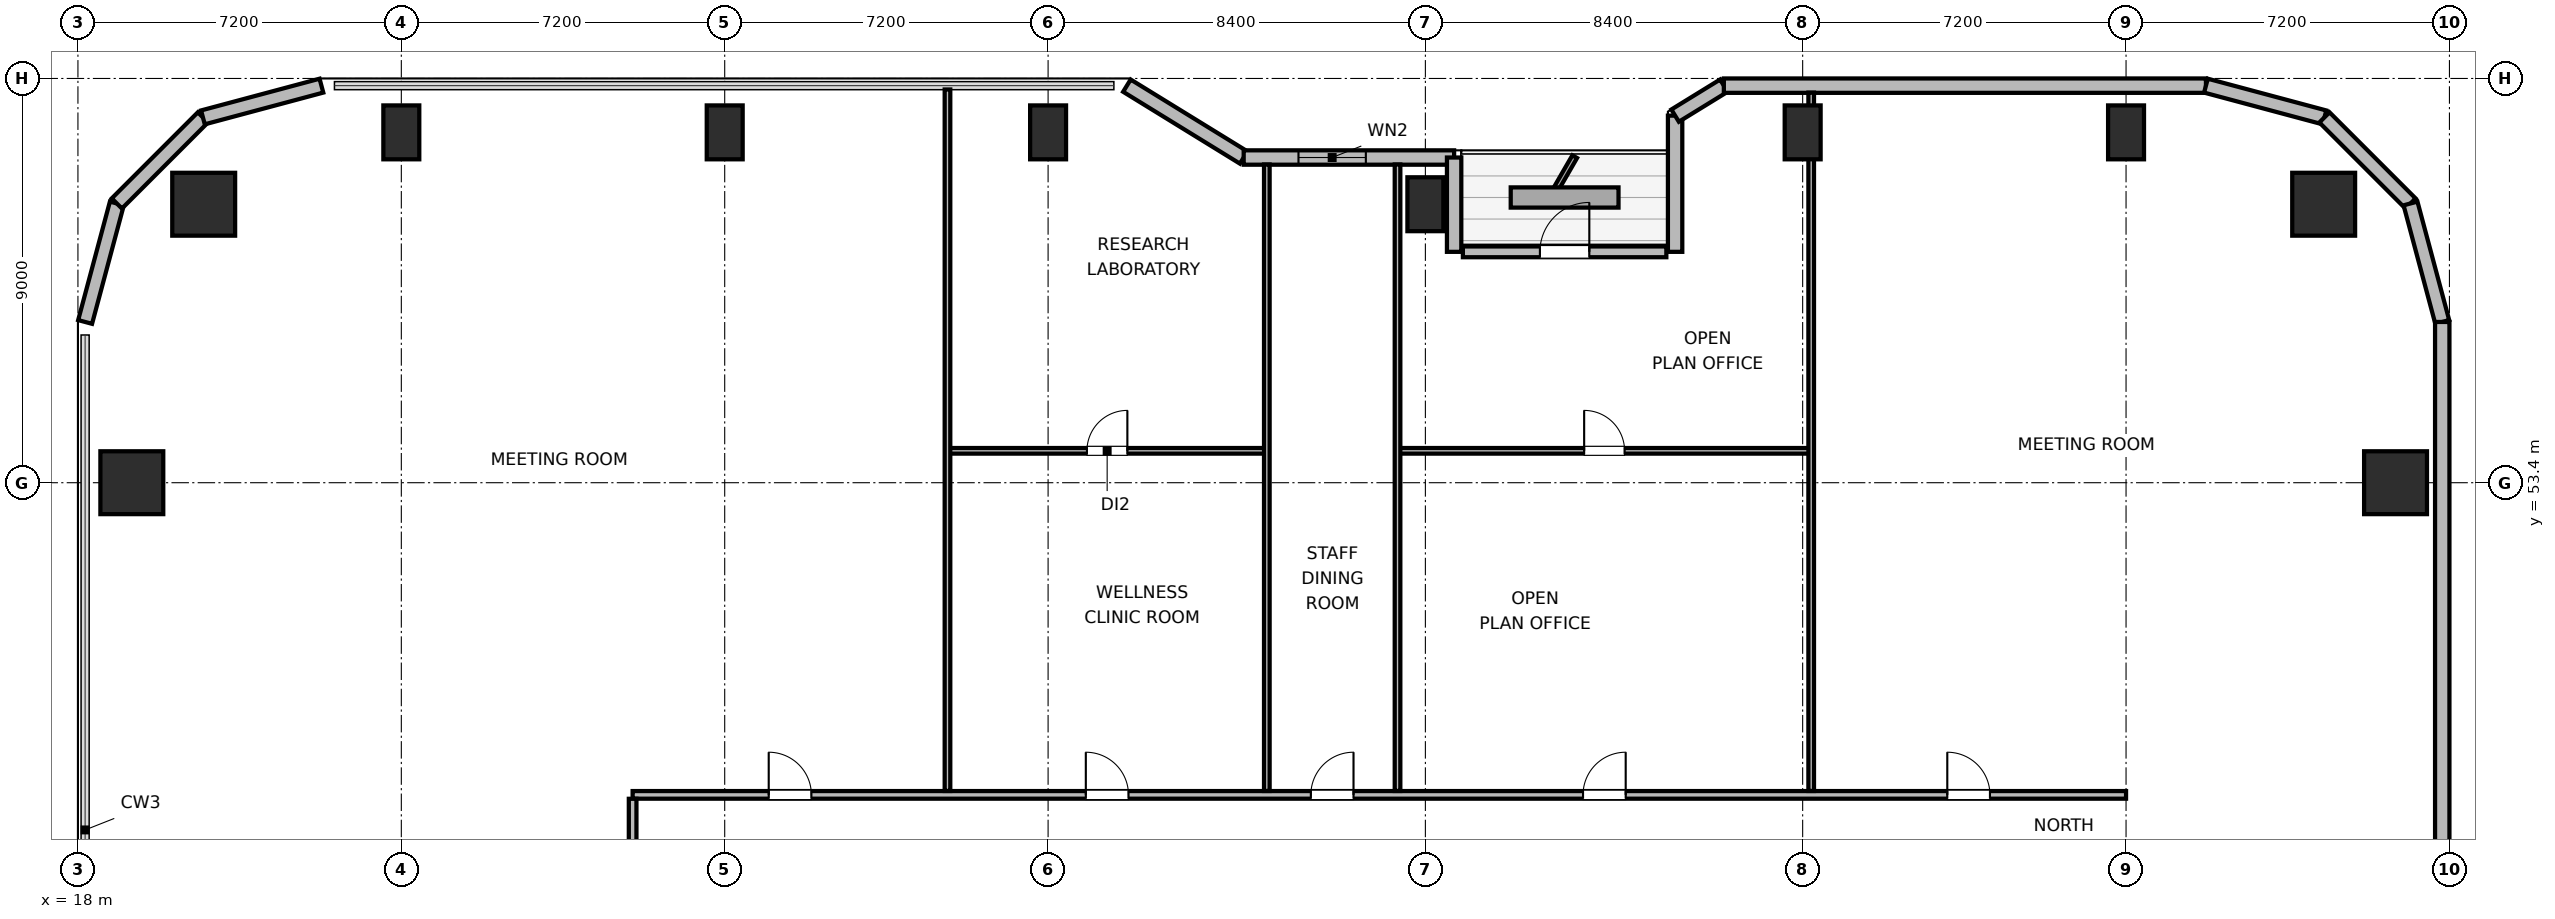
"""IFC4 building model, lengths in metres.
Left out: names, types, materials, properties, quantities, classifications, styles, units other than length and angle.
Written with IfcOpenShell. Run it as: python <this file> out.ifc"""

import sys

from ifc_helpers import new_model, si_unit, direction, frame, frame_2d, origin, origin_2d, place, context, subcontext, project, spatial, rectangle, circle, extrude, element, fill, save


model = new_model("IFC4")
c1 = context("Model", 3, precision=1e-05, world=origin(), true_north=direction((0.0, 1.0)))
c2 = subcontext(c1, "Body", "Model", "MODEL_VIEW")
j1 = project(units=[si_unit("LENGTHUNIT", "METRE"), si_unit("PLANEANGLEUNIT", "RADIAN")], contexts=[c1])
p1 = place(None, origin())
s1 = spatial("IfcSite", under=j1, at=p1, CompositionType="ELEMENT")
p2 = place(p1, origin())
s2 = spatial("IfcBuilding", under=s1, at=p2, CompositionType="ELEMENT")
p3 = place(p2, frame((0.0, 0.0, 141.6)))
s3 = spatial("IfcBuildingStorey", under=s2, at=p3, CompositionType="ELEMENT", Elevation=141.6)
for number, where, z_axis, x_axis in (
    (1, (68.0, 59.6, 0.0), (0.0, 0.0, 1.0), (1.0, 0.0, 0.0)),
    (2, (20.8, 59.6, 0.0), (0.0, 0.0, 1.0), (1.0, 0.0, 0.0)),
):
    element("IfcColumn", number, at=place(p3, frame(where, z_axis=z_axis, x_axis=x_axis)), inside=s3, PredefinedType="COLUMN", context=c2, shape_type="SweptSolid", body=[
        extrude(circle(Radius=0.7, at=origin_2d()), origin(), (0.0, 0.0, 1.0), 3.9),
    ])
for number, where, z_axis, x_axis in (
    (3, (25.2, 61.2, 0.0), (0.0, 0.0, 1.0), (1.0, 0.0, 0.0)),
    (4, (32.4, 61.2, 0.0), (0.0, 0.0, 1.0), (1.0, 0.0, 0.0)),
    (5, (39.6, 61.2, 0.0), (0.0, 0.0, 1.0), (1.0, 0.0, 0.0)),
    (6, (48.0, 59.6, 0.0), (0.0, 0.0, 1.0), (1.0, 0.0, 0.0)),
    (7, (56.4, 61.2, 0.0), (0.0, 0.0, 1.0), (1.0, 0.0, 0.0)),
    (8, (63.6, 61.2, 0.0), (0.0, 0.0, 1.0), (1.0, 0.0, 0.0)),
):
    element("IfcColumn", number, at=place(p3, frame(where, z_axis=z_axis, x_axis=x_axis)), inside=s3, PredefinedType="COLUMN", context=c2, shape_type="SweptSolid", body=[
        extrude(rectangle(XDim=0.8, YDim=1.2, at=origin_2d()), origin(), (0.0, 0.0, 1.0), 3.9),
    ])
for number, where, z_axis, x_axis in (
    (9, (19.2, 53.4, 0.0), (0.0, 0.0, 1.0), (1.0, 0.0, 0.0)),
    (10, (69.6, 53.4, 0.0), (0.0, 0.0, 1.0), (1.0, 0.0, 0.0)),
):
    element("IfcColumn", number, at=place(p3, frame(where, z_axis=z_axis, x_axis=x_axis)), inside=s3, PredefinedType="COLUMN", context=c2, shape_type="SweptSolid", body=[
        extrude(rectangle(XDim=1.4, YDim=1.4, at=origin_2d()), origin(), (0.0, 0.0, 1.0), 3.9),
    ])
p4 = place(p3, frame((18.16, 56.979, 0.0), z_axis=(0.0, 0.0, 1.0), x_axis=(0.25869736047, 0.965958423373, 0.0)))
e11 = element("IfcWall", 11, at=p4, inside=s3, PredefinedType="SOLIDWALL", context=c2, shape_type="SweptSolid", body=[
    extrude(rectangle(XDim=2.731, YDim=0.32, at=frame_2d((1.366, 0.0))), origin(), (0.0, 0.0, 1.0), 3.6),
])
p5 = place(p3, frame((18.866, 59.617, 0.0), z_axis=(0.0, 0.0, 1.0), x_axis=(0.707106781187, 0.707106781187, 0.0)))
e12 = element("IfcWall", 12, at=p5, inside=s3, PredefinedType="SOLIDWALL", context=c2, shape_type="SweptSolid", body=[
    extrude(rectangle(XDim=2.71, YDim=0.32, at=frame_2d((1.355, 0.0))), origin(), (0.0, 0.0, 1.0), 3.6),
])
p6 = place(p3, frame((20.783, 61.533, 0.0), z_axis=(0.0, 0.0, 1.0), x_axis=(0.965964405026, 0.25867502435, 0.0)))
e13 = element("IfcWall", 13, at=p6, inside=s3, PredefinedType="SOLIDWALL", context=c2, shape_type="SweptSolid", body=[
    extrude(rectangle(XDim=2.731, YDim=0.32, at=frame_2d((1.366, 0.0))), origin(), (0.0, 0.0, 1.0), 3.6),
])
p7 = place(p3, frame((41.355, 62.24, 0.0), z_axis=(0.0, 0.0, 1.0), x_axis=(0.851630857047, -0.524142044989, 0.0)))
e14 = element("IfcWall", 14, at=p7, inside=s3, PredefinedType="SOLIDWALL", context=c2, shape_type="SweptSolid", body=[
    extrude(rectangle(XDim=3.053, YDim=0.32, at=frame_2d((1.526, 0.0))), origin(), (0.0, 0.0, 1.0), 2.185),
])
p8 = place(p3, frame((43.955, 60.64, 0.0), z_axis=(0.0, 0.0, 1.0), x_axis=(1.0, 0.0, 0.0)))
e15 = element("IfcWall", 15, at=p8, inside=s3, PredefinedType="SOLIDWALL", context=c2, shape_type="SweptSolid", body=[
    extrude(rectangle(XDim=4.685, YDim=0.32, at=frame_2d((2.343, 0.0))), origin(), (0.0, 0.0, 1.0), 2.185),
])
p9 = place(p8, frame((1.22, 0.0, 0.85)))
e16 = element("IfcOpeningElement", 16, at=p9, cuts=e15, PredefinedType="OPENING", context=c2, shape_type="SweptSolid", body=[
    extrude(rectangle(XDim=1.5, YDim=1.1, at=frame_2d((0.75, 0.55))), frame((0.0, 0.17, 0.0), z_axis=(0.0, -1.0, 0.0), x_axis=(1.0, 0.0, 0.0)), (0.0, 0.0, 1.0), 0.34),
])
p10 = place(p3, frame((48.64, 60.64, 0.0), z_axis=(0.0, 0.0, 1.0), x_axis=(0.0, -1.0, 0.0)))
e17 = element("IfcWall", 17, at=p10, inside=s3, PredefinedType="SOLIDWALL", context=c2, shape_type="SweptSolid", body=[
    extrude(rectangle(XDim=2.1, YDim=0.32, at=frame_2d((1.05, 0.0))), origin(), (0.0, 0.0, 1.0), 2.135),
])
p11 = place(p3, frame((48.835, 58.54, 0.0), z_axis=(0.0, 0.0, 1.0), x_axis=(1.0, 0.0, 0.0)))
e18 = element("IfcWall", 18, at=p11, inside=s3, PredefinedType="SOLIDWALL", context=c2, shape_type="SweptSolid", body=[
    extrude(rectangle(XDim=4.53, YDim=0.24, at=frame_2d((2.265, 0.0))), origin(), (0.0, 0.0, 1.0), 2.135),
])
p12 = place(p11, frame((1.715, 0.0, 0.0)))
e19 = element("IfcOpeningElement", 19, at=p12, cuts=e18, PredefinedType="OPENING", context=c2, shape_type="SweptSolid", body=[
    extrude(rectangle(XDim=1.1, YDim=2.04, at=frame_2d((0.55, 1.02))), frame((0.0, 0.13, 0.0), z_axis=(0.0, -1.0, 0.0), x_axis=(1.0, 0.0, 0.0)), (0.0, 0.0, 1.0), 0.26),
])
p13 = place(p3, frame((53.56, 58.54, 0.0), z_axis=(0.0, 0.0, 1.0), x_axis=(0.0, 1.0, 0.0)))
e20 = element("IfcWall", 20, at=p13, inside=s3, PredefinedType="SOLIDWALL", context=c2, shape_type="SweptSolid", body=[
    extrude(rectangle(XDim=3.032, YDim=0.32, at=frame_2d((1.516, 0.0))), origin(), (0.0, 0.0, 1.0), 2.185),
])
p14 = place(p3, frame((53.56, 61.573, 0.0), z_axis=(0.0, 0.0, 1.0), x_axis=(0.851776724646, 0.523904964045, 0.0)))
e21 = element("IfcWall", 21, at=p14, inside=s3, PredefinedType="SOLIDWALL", context=c2, shape_type="SweptSolid", body=[
    extrude(rectangle(XDim=1.274, YDim=0.32, at=frame_2d((0.637, 0.0))), origin(), (0.0, 0.0, 1.0), 3.6),
])
p15 = place(p3, frame((54.645, 62.24, 0.0), z_axis=(0.0, 0.0, 1.0), x_axis=(1.0, 0.0, 0.0)))
e22 = element("IfcWall", 22, at=p15, inside=s3, PredefinedType="SOLIDWALL", context=c2, shape_type="SweptSolid", body=[
    extrude(rectangle(XDim=10.734, YDim=0.32, at=frame_2d((5.367, 0.0))), origin(), (0.0, 0.0, 1.0), 3.6),
])
p16 = place(p3, frame((65.379, 62.24, 0.0), z_axis=(0.0, 0.0, 1.0), x_axis=(0.965958423373, -0.25869736047, 0.0)))
e23 = element("IfcWall", 23, at=p16, inside=s3, PredefinedType="SOLIDWALL", context=c2, shape_type="SweptSolid", body=[
    extrude(rectangle(XDim=2.731, YDim=0.32, at=frame_2d((1.366, 0.0))), origin(), (0.0, 0.0, 1.0), 3.6),
])
p17 = place(p3, frame((68.017, 61.533, 0.0), z_axis=(0.0, 0.0, 1.0), x_axis=(0.707151821269, -0.707061738235, 0.0)))
e24 = element("IfcWall", 24, at=p17, inside=s3, PredefinedType="SOLIDWALL", context=c2, shape_type="SweptSolid", body=[
    extrude(rectangle(XDim=2.71, YDim=0.32, at=frame_2d((1.355, 0.0))), origin(), (0.0, 0.0, 1.0), 3.6),
])
p18 = place(p3, frame((69.934, 59.617, 0.0), z_axis=(0.0, 0.0, 1.0), x_axis=(0.258613949072, -0.965980758269, 0.0)))
e25 = element("IfcWall", 25, at=p18, inside=s3, PredefinedType="SOLIDWALL", context=c2, shape_type="SweptSolid", body=[
    extrude(rectangle(XDim=2.731, YDim=0.32, at=frame_2d((1.366, 0.0))), origin(), (0.0, 0.0, 1.0), 3.6),
])
p19 = place(p3, frame((70.64, 56.979, 0.0), z_axis=(0.0, 0.0, 1.0), x_axis=(0.0, -1.0, 0.0)))
e26 = element("IfcWall", 26, at=p19, inside=s3, PredefinedType="SOLIDWALL", context=c2, shape_type="SweptSolid", body=[
    extrude(rectangle(XDim=14.219, YDim=0.32, at=frame_2d((7.109, 0.0))), origin(), (0.0, 0.0, 1.0), 3.6),
])
p20 = place(p3, frame((30.35, 46.45, 0.0), z_axis=(0.0, 0.0, 1.0), x_axis=(1.0, 0.0, 0.0)))
e27 = element("IfcWall", 27, at=p20, inside=s3, PredefinedType="PARTITIONING", context=c2, shape_type="SweptSolid", body=[
    extrude(rectangle(XDim=33.25, YDim=0.17, at=frame_2d((16.625, 0.0))), origin(), (0.0, 0.0, 1.0), 3.6),
])
p21 = place(p20, frame((3.03, 0.0, 0.0)))
e28 = element("IfcOpeningElement", 28, at=p21, cuts=e27, PredefinedType="OPENING", context=c2, shape_type="SweptSolid", body=[
    extrude(rectangle(XDim=0.95, YDim=2.04, at=frame_2d((0.475, 1.02))), frame((0.0, 0.095, 0.0), z_axis=(0.0, -1.0, 0.0), x_axis=(1.0, 0.0, 0.0)), (0.0, 0.0, 1.0), 0.19),
])
p22 = place(p20, frame((10.09, 0.0, 0.0)))
e29 = element("IfcOpeningElement", 29, at=p22, cuts=e27, PredefinedType="OPENING", context=c2, shape_type="SweptSolid", body=[
    extrude(rectangle(XDim=0.95, YDim=2.04, at=frame_2d((0.475, 1.02))), frame((0.0, 0.095, 0.0), z_axis=(0.0, -1.0, 0.0), x_axis=(1.0, 0.0, 0.0)), (0.0, 0.0, 1.0), 0.19),
])
p23 = place(p20, frame((15.1, 0.0, 0.0)))
e30 = element("IfcOpeningElement", 30, at=p23, cuts=e27, PredefinedType="OPENING", context=c2, shape_type="SweptSolid", body=[
    extrude(rectangle(XDim=0.95, YDim=2.04, at=frame_2d((0.475, 1.02))), frame((0.0, 0.095, 0.0), z_axis=(0.0, -1.0, 0.0), x_axis=(1.0, 0.0, 0.0)), (0.0, 0.0, 1.0), 0.19),
])
p24 = place(p20, frame((21.16, 0.0, 0.0)))
e31 = element("IfcOpeningElement", 31, at=p24, cuts=e27, PredefinedType="OPENING", context=c2, shape_type="SweptSolid", body=[
    extrude(rectangle(XDim=0.95, YDim=2.04, at=frame_2d((0.475, 1.02))), frame((0.0, 0.095, 0.0), z_axis=(0.0, -1.0, 0.0), x_axis=(1.0, 0.0, 0.0)), (0.0, 0.0, 1.0), 0.19),
])
p25 = place(p20, frame((29.27, 0.0, 0.0)))
e32 = element("IfcOpeningElement", 32, at=p25, cuts=e27, PredefinedType="OPENING", context=c2, shape_type="SweptSolid", body=[
    extrude(rectangle(XDim=0.95, YDim=2.04, at=frame_2d((0.475, 1.02))), frame((0.0, 0.095, 0.0), z_axis=(0.0, -1.0, 0.0), x_axis=(1.0, 0.0, 0.0)), (0.0, 0.0, 1.0), 0.19),
])
p26 = place(p3, frame((30.35, 37.1, 0.0), z_axis=(0.0, 0.0, 1.0), x_axis=(0.0, 1.0, 0.0)))
e33 = element("IfcWall", 33, at=p26, inside=s3, PredefinedType="PARTITIONING", context=c2, shape_type="SweptSolid", body=[
    extrude(rectangle(XDim=9.263, YDim=0.17, at=frame_2d((4.631, 0.0))), origin(), (0.0, 0.0, 1.0), 3.6),
])
p27 = place(p26, frame((4.2, 0.0, 0.0)))
e34 = element("IfcOpeningElement", 34, at=p27, cuts=e33, PredefinedType="OPENING", context=c2, shape_type="SweptSolid", body=[
    extrude(rectangle(XDim=0.95, YDim=2.04, at=frame_2d((0.475, 1.02))), frame((0.0, 0.095, 0.0), z_axis=(0.0, -1.0, 0.0), x_axis=(1.0, 0.0, 0.0)), (0.0, 0.0, 1.0), 0.19),
])
p28 = place(p3, frame((37.36, 54.11, 0.0), z_axis=(0.0, 0.0, 1.0), x_axis=(1.0, 0.0, 0.0)))
e35 = element("IfcWall", 35, at=p28, inside=s3, PredefinedType="PARTITIONING", context=c2, shape_type="SweptSolid", body=[
    extrude(rectangle(XDim=7.11, YDim=0.125, at=frame_2d((3.555, 0.0))), origin(), (0.0, 0.0, 1.0), 3.6),
])
p29 = place(p28, frame((3.105, 0.0, 0.0)))
e36 = element("IfcOpeningElement", 36, at=p29, cuts=e35, PredefinedType="OPENING", context=c2, shape_type="SweptSolid", body=[
    extrude(rectangle(XDim=0.9, YDim=2.02, at=frame_2d((0.45, 1.01))), frame((0.0, 0.073, 0.0), z_axis=(0.0, -1.0, 0.0), x_axis=(1.0, 0.0, 0.0)), (0.0, 0.0, 1.0), 0.145),
])
p30 = place(p3, frame((37.36, 46.537, 0.0), z_axis=(0.0, 0.0, 1.0), x_axis=(0.0, 1.0, 0.0)))
e37 = element("IfcWall", 37, at=p30, inside=s3, PredefinedType="PARTITIONING", context=c2, shape_type="SweptSolid", body=[
    extrude(rectangle(XDim=15.618, YDim=0.125, at=frame_2d((7.809, 0.0))), origin(), (0.0, 0.0, 1.0), 3.6),
])
p31 = place(p3, frame((44.47, 46.537, 0.0), z_axis=(0.0, 0.0, 1.0), x_axis=(0.0, 1.0, 0.0)))
e38 = element("IfcWall", 38, at=p31, inside=s3, PredefinedType="PARTITIONING", context=c2, shape_type="SweptSolid", body=[
    extrude(rectangle(XDim=13.948, YDim=0.125, at=frame_2d((6.974, 0.0))), origin(), (0.0, 0.0, 1.0), 2.963),
])
p32 = place(p3, frame((47.38, 54.11, 0.0), z_axis=(0.0, 0.0, 1.0), x_axis=(1.0, 0.0, 0.0)))
e39 = element("IfcWall", 39, at=p32, inside=s3, PredefinedType="PARTITIONING", context=c2, shape_type="SweptSolid", body=[
    extrude(rectangle(XDim=9.21, YDim=0.125, at=frame_2d((4.605, 0.0))), origin(), (0.0, 0.0, 1.0), 3.6),
])
p33 = place(p32, frame((4.155, 0.0, 0.0)))
e40 = element("IfcOpeningElement", 40, at=p33, cuts=e39, PredefinedType="OPENING", context=c2, shape_type="SweptSolid", body=[
    extrude(rectangle(XDim=0.9, YDim=2.02, at=frame_2d((0.45, 1.01))), frame((0.0, 0.073, 0.0), z_axis=(0.0, -1.0, 0.0), x_axis=(1.0, 0.0, 0.0)), (0.0, 0.0, 1.0), 0.145),
])
p34 = place(p3, frame((47.38, 46.537, 0.0), z_axis=(0.0, 0.0, 1.0), x_axis=(0.0, 1.0, 0.0)))
e41 = element("IfcWall", 41, at=p34, inside=s3, PredefinedType="PARTITIONING", context=c2, shape_type="SweptSolid", body=[
    extrude(rectangle(XDim=13.948, YDim=0.125, at=frame_2d((6.974, 0.0))), origin(), (0.0, 0.0, 1.0), 3.6),
])
p35 = place(p3, frame((56.59, 46.537, 0.0), z_axis=(0.0, 0.0, 1.0), x_axis=(0.0, 1.0, 0.0)))
e42 = element("IfcWall", 42, at=p35, inside=s3, PredefinedType="PARTITIONING", context=c2, shape_type="SweptSolid", body=[
    extrude(rectangle(XDim=15.548, YDim=0.125, at=frame_2d((7.774, 0.0))), origin(), (0.0, 0.0, 1.0), 2.135),
])
p36 = place(p9, origin())
e43 = element("IfcWindow", 43, at=p36, inside=s3, PartitioningType="SINGLE_PANEL", PredefinedType="WINDOW", context=c2, shape_type="SweptSolid", body=[
    extrude(rectangle(XDim=1.5, YDim=1.1, at=frame_2d((0.75, 0.55))), frame((0.0, 0.03, 0.0), z_axis=(0.0, -1.0, 0.0), x_axis=(1.0, 0.0, 0.0)), (0.0, 0.0, 1.0), 0.06),
])
fill(e16, e43)
p37 = place(p12, origin())
e44 = element("IfcDoor", 44, at=p37, inside=s3, OperationType="SINGLE_SWING_RIGHT", PredefinedType="DOOR", context=c2, shape_type="SweptSolid", body=[
    extrude(rectangle(XDim=1.1, YDim=2.04, at=frame_2d((0.55, 1.02))), frame((0.0, 0.025, 0.0), z_axis=(0.0, -1.0, 0.0), x_axis=(1.0, 0.0, 0.0)), (0.0, 0.0, 1.0), 0.05),
])
fill(e19, e44)
p38 = place(p21, origin())
e45 = element("IfcDoor", 45, at=p38, inside=s3, OperationType="SINGLE_SWING_LEFT", PredefinedType="DOOR", context=c2, shape_type="SweptSolid", body=[
    extrude(rectangle(XDim=0.95, YDim=2.04, at=frame_2d((0.475, 1.02))), frame((0.0, 0.025, 0.0), z_axis=(0.0, -1.0, 0.0), x_axis=(1.0, 0.0, 0.0)), (0.0, 0.0, 1.0), 0.05),
])
fill(e28, e45)
p39 = place(p29, origin())
e46 = element("IfcDoor", 46, at=p39, inside=s3, OperationType="SINGLE_SWING_RIGHT", PredefinedType="DOOR", context=c2, shape_type="SweptSolid", body=[
    extrude(rectangle(XDim=0.9, YDim=2.02, at=frame_2d((0.45, 1.01))), frame((0.0, 0.025, 0.0), z_axis=(0.0, -1.0, 0.0), x_axis=(1.0, 0.0, 0.0)), (0.0, 0.0, 1.0), 0.05),
])
fill(e36, e46)
p40 = place(p22, origin())
e47 = element("IfcDoor", 47, at=p40, inside=s3, OperationType="SINGLE_SWING_LEFT", PredefinedType="DOOR", context=c2, shape_type="SweptSolid", body=[
    extrude(rectangle(XDim=0.95, YDim=2.04, at=frame_2d((0.475, 1.02))), frame((0.0, 0.025, 0.0), z_axis=(0.0, -1.0, 0.0), x_axis=(1.0, 0.0, 0.0)), (0.0, 0.0, 1.0), 0.05),
])
fill(e29, e47)
p41 = place(p23, origin())
e48 = element("IfcDoor", 48, at=p41, inside=s3, OperationType="SINGLE_SWING_RIGHT", PredefinedType="DOOR", context=c2, shape_type="SweptSolid", body=[
    extrude(rectangle(XDim=0.95, YDim=2.04, at=frame_2d((0.475, 1.02))), frame((0.0, 0.025, 0.0), z_axis=(0.0, -1.0, 0.0), x_axis=(1.0, 0.0, 0.0)), (0.0, 0.0, 1.0), 0.05),
])
fill(e30, e48)
p42 = place(p33, origin())
e49 = element("IfcDoor", 49, at=p42, inside=s3, OperationType="SINGLE_SWING_LEFT", PredefinedType="DOOR", context=c2, shape_type="SweptSolid", body=[
    extrude(rectangle(XDim=0.9, YDim=2.02, at=frame_2d((0.45, 1.01))), frame((0.0, 0.025, 0.0), z_axis=(0.0, -1.0, 0.0), x_axis=(1.0, 0.0, 0.0)), (0.0, 0.0, 1.0), 0.05),
])
fill(e40, e49)
p43 = place(p24, origin())
e50 = element("IfcDoor", 50, at=p43, inside=s3, OperationType="SINGLE_SWING_RIGHT", PredefinedType="DOOR", context=c2, shape_type="SweptSolid", body=[
    extrude(rectangle(XDim=0.95, YDim=2.04, at=frame_2d((0.475, 1.02))), frame((0.0, 0.025, 0.0), z_axis=(0.0, -1.0, 0.0), x_axis=(1.0, 0.0, 0.0)), (0.0, 0.0, 1.0), 0.05),
])
fill(e31, e50)
p44 = place(p25, origin())
e51 = element("IfcDoor", 51, at=p44, inside=s3, OperationType="SINGLE_SWING_LEFT", PredefinedType="DOOR", context=c2, shape_type="SweptSolid", body=[
    extrude(rectangle(XDim=0.95, YDim=2.04, at=frame_2d((0.475, 1.02))), frame((0.0, 0.025, 0.0), z_axis=(0.0, -1.0, 0.0), x_axis=(1.0, 0.0, 0.0)), (0.0, 0.0, 1.0), 0.05),
])
fill(e32, e51)
save(model, sys.argv[1])
